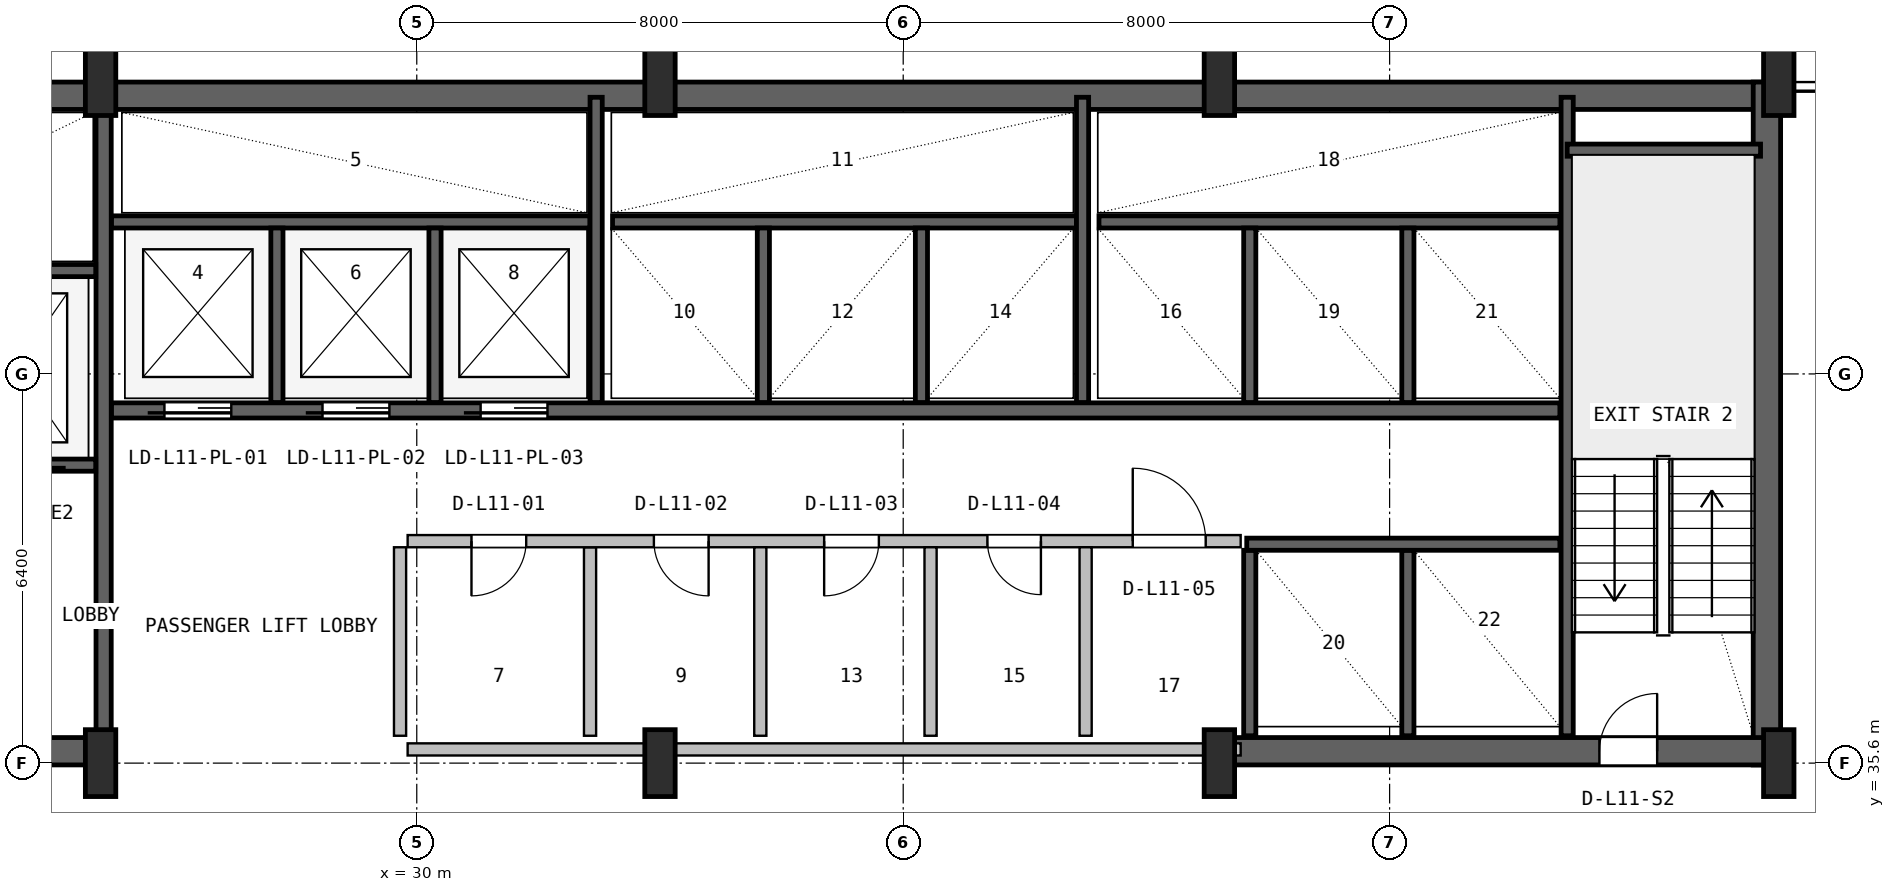
"""IFC4 building model, lengths in metres.
Left out: names, types, materials, properties, quantities, classifications, styles, units other than length and angle.
Written with IfcOpenShell. Run it as: python <this file> out.ifc"""

import sys

from ifc_helpers import new_model, si_unit, direction, frame, frame_2d, origin, origin_2d, place, context, subcontext, project, spatial, rectangle, i_section, extrude, source, transform, mapped, element, fill, save


model = new_model("IFC4")
c1 = context("Model", 3, precision=1e-05, world=origin(), true_north=direction((0.0, 1.0)))
c2 = subcontext(c1, "Body", "Model", "MODEL_VIEW")
j1 = project(units=[si_unit("LENGTHUNIT", "METRE"), si_unit("PLANEANGLEUNIT", "RADIAN")], contexts=[c1])
p1 = place(None, origin())
s1 = spatial("IfcSite", under=j1, at=p1, CompositionType="ELEMENT")
p2 = place(p1, origin())
s2 = spatial("IfcBuilding", under=s1, at=p2, CompositionType="ELEMENT")
p3 = place(p2, frame((0.0, 0.0, 51.0)))
s3 = spatial("IfcBuildingStorey", under=s2, at=p3, CompositionType="ELEMENT", Elevation=51.0)
p4 = place(p3, frame((15.6, 46.575, 0.0), z_axis=(0.0, 0.0, 1.0), x_axis=(1.0, 0.0, 0.0)))
e1 = element("IfcWall", 1, at=p4, inside=s3, PredefinedType="SHEAR", context=c2, shape_type="SweptSolid", body=[
    extrude(rectangle(XDim=36.8, YDim=0.45, at=frame_2d((18.4, 0.0))), origin(), (0.0, 0.0, 1.0), 3.65),
])
p5 = place(p3, frame((52.205, 35.57, 0.0), z_axis=(0.0, 0.0, 1.0), x_axis=(0.0, 1.0, 0.0)))
e2 = element("IfcWall", 2, at=p5, inside=s3, PredefinedType="SHEAR", context=c2, shape_type="SweptSolid", body=[
    extrude(rectangle(XDim=11.23, YDim=0.45, at=frame_2d((5.615, 0.0))), origin(), (0.0, 0.0, 1.0), 3.65),
])
p6 = place(p3, frame((15.57, 35.795, 0.0), z_axis=(0.0, 0.0, 1.0), x_axis=(1.0, 0.0, 0.0)))
e3 = element("IfcWall", 3, at=p6, inside=s3, PredefinedType="SHEAR", context=c2, shape_type="SweptSolid", body=[
    extrude(rectangle(XDim=9.23, YDim=0.45, at=frame_2d((4.615, 0.0))), origin(), (0.0, 0.0, 1.0), 3.65),
])
p7 = place(p6, frame((5.4, 0.0, 0.0)))
e4 = element("IfcOpeningElement", 4, at=p7, cuts=e3, PredefinedType="OPENING", context=c2, shape_type="SweptSolid", body=[
    extrude(rectangle(XDim=1.0, YDim=2.1, at=frame_2d((0.5, 1.05))), frame((0.0, 0.235, 0.0), z_axis=(0.0, -1.0, 0.0), x_axis=(1.0, 0.0, 0.0)), (0.0, 0.0, 1.0), 0.47),
])
p8 = place(p3, frame((43.2, 35.795, 0.0), z_axis=(0.0, 0.0, 1.0), x_axis=(1.0, 0.0, 0.0)))
e5 = element("IfcWall", 5, at=p8, inside=s3, PredefinedType="SHEAR", context=c2, shape_type="SweptSolid", body=[
    extrude(rectangle(XDim=9.23, YDim=0.45, at=frame_2d((4.615, 0.0))), origin(), (0.0, 0.0, 1.0), 3.65),
])
p9 = place(p8, frame((6.25, 0.0, 0.0)))
e6 = element("IfcOpeningElement", 6, at=p9, cuts=e5, PredefinedType="OPENING", context=c2, shape_type="SweptSolid", body=[
    extrude(rectangle(XDim=0.95, YDim=2.1, at=frame_2d((0.475, 1.05))), frame((0.0, 0.235, 0.0), z_axis=(0.0, -1.0, 0.0), x_axis=(1.0, 0.0, 0.0)), (0.0, 0.0, 1.0), 0.47),
])
m1 = source(origin(), c2, "Body", "SweptSolid", [
    extrude(i_section(OverallWidth=0.5, OverallDepth=1.1, WebThickness=0.018, FlangeThickness=0.032, FilletRadius=0.018, at=origin_2d()), origin(), (0.0, 0.0, 1.0), 3.9),
])
for number, where, z_axis, x_axis in (
    (7, (24.8, 35.6, 0.0), (0.0, 0.0, 1.0), (1.0, 0.0, 0.0)),
    (8, (24.8, 46.8, 0.0), (0.0, 0.0, 1.0), (1.0, 0.0, 0.0)),
    (9, (34.0, 35.6, 0.0), (0.0, 0.0, 1.0), (1.0, 0.0, 0.0)),
    (10, (34.0, 46.8, 0.0), (0.0, 0.0, 1.0), (1.0, 0.0, 0.0)),
    (11, (43.2, 35.6, 0.0), (0.0, 0.0, 1.0), (1.0, 0.0, 0.0)),
    (12, (43.2, 46.8, 0.0), (0.0, 0.0, 1.0), (1.0, 0.0, 0.0)),
    (13, (52.4, 35.6, 0.0), (0.0, 0.0, 1.0), (1.0, 0.0, 0.0)),
    (14, (52.4, 46.8, 0.0), (0.0, 0.0, 1.0), (1.0, 0.0, 0.0)),
):
    element("IfcColumn", number, at=place(p3, frame(where, z_axis=z_axis, x_axis=x_axis)), inside=s3, PredefinedType="COLUMN", context=c2, shape_type="MappedRepresentation", body=[
        mapped(m1, transform((0.0, 0.0, 0.0), x_axis=(1.0, 0.0, 0.0), y_axis=(0.0, 1.0, 0.0), z_axis=(0.0, 0.0, 1.0), scale=1.0)),
    ])
p10 = place(p3, frame((24.85, 36.05, 0.0), z_axis=(0.0, 0.0, 1.0), x_axis=(0.0, 1.0, 0.0)))
e15 = element("IfcWall", 15, at=p10, inside=s3, PredefinedType="SHEAR", context=c2, shape_type="SweptSolid", body=[
    extrude(rectangle(XDim=10.45, YDim=0.25, at=frame_2d((5.225, 0.0))), origin(), (0.0, 0.0, 1.0), 3.65),
])
p11 = place(p3, frame((19.2, 40.5, 0.0), z_axis=(0.0, 0.0, 1.0), x_axis=(1.0, 0.0, 0.0)))
e16 = element("IfcWall", 16, at=p11, inside=s3, PredefinedType="SHEAR", context=c2, shape_type="SweptSolid", body=[
    extrude(rectangle(XDim=5.52, YDim=0.2, at=frame_2d((2.76, 0.0))), origin(), (0.0, 0.0, 1.0), 3.65),
])
p12 = place(p11, frame((1.05, 0.0, 0.0)))
e17 = element("IfcOpeningElement", 17, at=p12, cuts=e16, PredefinedType="OPENING", context=c2, shape_type="SweptSolid", body=[
    extrude(rectangle(XDim=1.1, YDim=2.18, at=frame_2d((0.55, 1.09))), frame((0.0, 0.11, 0.0), z_axis=(0.0, -1.0, 0.0), x_axis=(1.0, 0.0, 0.0)), (0.0, 0.0, 1.0), 0.22),
])
p13 = place(p11, frame((3.65, 0.0, 0.0)))
e18 = element("IfcOpeningElement", 18, at=p13, cuts=e16, PredefinedType="OPENING", context=c2, shape_type="SweptSolid", body=[
    extrude(rectangle(XDim=1.1, YDim=2.18, at=frame_2d((0.55, 1.09))), frame((0.0, 0.11, 0.0), z_axis=(0.0, -1.0, 0.0), x_axis=(1.0, 0.0, 0.0)), (0.0, 0.0, 1.0), 0.22),
])
p14 = place(p3, frame((19.2, 43.7, 0.0), z_axis=(0.0, 0.0, 1.0), x_axis=(1.0, 0.0, 0.0)))
e19 = element("IfcWall", 19, at=p14, inside=s3, PredefinedType="SHEAR", context=c2, shape_type="SweptSolid", body=[
    extrude(rectangle(XDim=5.52, YDim=0.2, at=frame_2d((2.76, 0.0))), origin(), (0.0, 0.0, 1.0), 3.65),
])
p15 = place(p3, frame((48.92, 36.05, 0.0), z_axis=(0.0, 0.0, 1.0), x_axis=(0.0, 1.0, 0.0)))
e20 = element("IfcWall", 20, at=p15, inside=s3, PredefinedType="SHEAR", context=c2, shape_type="SweptSolid", body=[
    extrude(rectangle(XDim=10.5, YDim=0.2, at=frame_2d((5.25, 0.0))), origin(), (0.0, 0.0, 1.0), 3.65),
])
p16 = place(p3, frame((48.92, 45.68, 0.0), z_axis=(0.0, 0.0, 1.0), x_axis=(1.0, 0.0, 0.0)))
e21 = element("IfcWall", 21, at=p16, inside=s3, PredefinedType="SHEAR", context=c2, shape_type="SweptSolid", body=[
    extrude(rectangle(XDim=3.18, YDim=0.2, at=frame_2d((1.59, 0.0))), origin(), (0.0, 0.0, 1.0), 3.65),
])
p17 = place(p3, frame((24.98, 41.4, 0.0), z_axis=(0.0, 0.0, 1.0), x_axis=(1.0, 0.0, 0.0)))
e22 = element("IfcWall", 22, at=p17, inside=s3, PredefinedType="SHEAR", context=c2, shape_type="SweptSolid", body=[
    extrude(rectangle(XDim=23.82, YDim=0.25, at=frame_2d((11.91, 0.0))), origin(), (0.0, 0.0, 1.0), 3.65),
])
p18 = place(p17, frame((0.87, 0.0, 0.0)))
e23 = element("IfcOpeningElement", 23, at=p18, cuts=e22, PredefinedType="OPENING", context=c2, shape_type="SweptSolid", body=[
    extrude(rectangle(XDim=1.1, YDim=2.18, at=frame_2d((0.55, 1.09))), frame((0.0, 0.135, 0.0), z_axis=(0.0, -1.0, 0.0), x_axis=(1.0, 0.0, 0.0)), (0.0, 0.0, 1.0), 0.27),
])
p19 = place(p17, frame((3.47, 0.0, 0.0)))
e24 = element("IfcOpeningElement", 24, at=p19, cuts=e22, PredefinedType="OPENING", context=c2, shape_type="SweptSolid", body=[
    extrude(rectangle(XDim=1.1, YDim=2.18, at=frame_2d((0.55, 1.09))), frame((0.0, 0.135, 0.0), z_axis=(0.0, -1.0, 0.0), x_axis=(1.0, 0.0, 0.0)), (0.0, 0.0, 1.0), 0.27),
])
p20 = place(p17, frame((6.07, 0.0, 0.0)))
e25 = element("IfcOpeningElement", 25, at=p20, cuts=e22, PredefinedType="OPENING", context=c2, shape_type="SweptSolid", body=[
    extrude(rectangle(XDim=1.1, YDim=2.18, at=frame_2d((0.55, 1.09))), frame((0.0, 0.135, 0.0), z_axis=(0.0, -1.0, 0.0), x_axis=(1.0, 0.0, 0.0)), (0.0, 0.0, 1.0), 0.27),
])
p21 = place(p3, frame((24.98, 44.5, 0.0), z_axis=(0.0, 0.0, 1.0), x_axis=(1.0, 0.0, 0.0)))
e26 = element("IfcWall", 26, at=p21, inside=s3, PredefinedType="SHEAR", context=c2, shape_type="SweptSolid", body=[
    extrude(rectangle(XDim=7.87, YDim=0.2, at=frame_2d((3.935, 0.0))), origin(), (0.0, 0.0, 1.0), 3.65),
])
for number, where, z_axis, x_axis in (
    (27, (27.7, 41.53, 0.0), (0.0, 0.0, 1.0), (0.0, 1.0, 0.0)),
    (28, (30.3, 41.53, 0.0), (0.0, 0.0, 1.0), (0.0, 1.0, 0.0)),
):
    element("IfcWall", number, at=place(p3, frame(where, z_axis=z_axis, x_axis=x_axis)), inside=s3, PredefinedType="SHEAR", context=c2, shape_type="SweptSolid", body=[
        extrude(rectangle(XDim=2.87, YDim=0.2, at=frame_2d((1.435, 0.0))), origin(), (0.0, 0.0, 1.0), 3.65),
    ])
p22 = place(p3, frame((32.95, 41.53, 0.0), z_axis=(0.0, 0.0, 1.0), x_axis=(0.0, 1.0, 0.0)))
e29 = element("IfcWall", 29, at=p22, inside=s3, PredefinedType="SHEAR", context=c2, shape_type="SweptSolid", body=[
    extrude(rectangle(XDim=5.02, YDim=0.2, at=frame_2d((2.51, 0.0))), origin(), (0.0, 0.0, 1.0), 3.65),
])
p23 = place(p3, frame((33.22, 44.5, 0.0), z_axis=(0.0, 0.0, 1.0), x_axis=(1.0, 0.0, 0.0)))
e30 = element("IfcWall", 30, at=p23, inside=s3, PredefinedType="SHEAR", context=c2, shape_type="SweptSolid", body=[
    extrude(rectangle(XDim=7.63, YDim=0.2, at=frame_2d((3.815, 0.0))), origin(), (0.0, 0.0, 1.0), 3.65),
])
for number, where, z_axis, x_axis in (
    (31, (35.7, 41.53, 0.0), (0.0, 0.0, 1.0), (0.0, 1.0, 0.0)),
    (32, (38.3, 41.53, 0.0), (0.0, 0.0, 1.0), (0.0, 1.0, 0.0)),
):
    element("IfcWall", number, at=place(p3, frame(where, z_axis=z_axis, x_axis=x_axis)), inside=s3, PredefinedType="SHEAR", context=c2, shape_type="SweptSolid", body=[
        extrude(rectangle(XDim=2.87, YDim=0.2, at=frame_2d((1.435, 0.0))), origin(), (0.0, 0.0, 1.0), 3.65),
    ])
p24 = place(p3, frame((40.95, 41.53, 0.0), z_axis=(0.0, 0.0, 1.0), x_axis=(0.0, 1.0, 0.0)))
e33 = element("IfcWall", 33, at=p24, inside=s3, PredefinedType="SHEAR", context=c2, shape_type="SweptSolid", body=[
    extrude(rectangle(XDim=5.02, YDim=0.2, at=frame_2d((2.51, 0.0))), origin(), (0.0, 0.0, 1.0), 3.65),
])
p25 = place(p3, frame((41.22, 44.5, 0.0), z_axis=(0.0, 0.0, 1.0), x_axis=(1.0, 0.0, 0.0)))
e34 = element("IfcWall", 34, at=p25, inside=s3, PredefinedType="SHEAR", context=c2, shape_type="SweptSolid", body=[
    extrude(rectangle(XDim=7.58, YDim=0.2, at=frame_2d((3.79, 0.0))), origin(), (0.0, 0.0, 1.0), 3.65),
])
for number, where, z_axis, x_axis in (
    (35, (43.7, 41.53, 0.0), (0.0, 0.0, 1.0), (0.0, 1.0, 0.0)),
    (36, (46.3, 41.53, 0.0), (0.0, 0.0, 1.0), (0.0, 1.0, 0.0)),
):
    element("IfcWall", number, at=place(p3, frame(where, z_axis=z_axis, x_axis=x_axis)), inside=s3, PredefinedType="SHEAR", context=c2, shape_type="SweptSolid", body=[
        extrude(rectangle(XDim=2.87, YDim=0.2, at=frame_2d((1.435, 0.0))), origin(), (0.0, 0.0, 1.0), 3.65),
    ])
for number, where, z_axis, x_axis in (
    (37, (43.7, 36.05, 0.0), (0.0, 0.0, 1.0), (0.0, 1.0, 0.0)),
    (38, (46.3, 36.05, 0.0), (0.0, 0.0, 1.0), (0.0, 1.0, 0.0)),
):
    element("IfcWall", number, at=place(p3, frame(where, z_axis=z_axis, x_axis=x_axis)), inside=s3, PredefinedType="SHEAR", context=c2, shape_type="SweptSolid", body=[
        extrude(rectangle(XDim=3.05, YDim=0.2, at=frame_2d((1.525, 0.0))), origin(), (0.0, 0.0, 1.0), 3.65),
    ])
p26 = place(p3, frame((43.65, 39.2, 0.0), z_axis=(0.0, 0.0, 1.0), x_axis=(1.0, 0.0, 0.0)))
e39 = element("IfcWall", 39, at=p26, inside=s3, PredefinedType="SHEAR", context=c2, shape_type="SweptSolid", body=[
    extrude(rectangle(XDim=5.15, YDim=0.2, at=frame_2d((2.575, 0.0))), origin(), (0.0, 0.0, 1.0), 3.65),
])
p27 = place(p3, frame((29.85, 35.825, 0.0), z_axis=(0.0, 0.0, 1.0), x_axis=(1.0, 0.0, 0.0)))
e40 = element("IfcWall", 40, at=p27, inside=s3, PredefinedType="SOLIDWALL", context=c2, shape_type="SweptSolid", body=[
    extrude(rectangle(XDim=13.7, YDim=0.2, at=frame_2d((6.85, 0.0))), origin(), (0.0, 0.0, 1.0), 2.425),
])
p28 = place(p3, frame((32.85, 36.05, 0.0), z_axis=(0.0, 0.0, 1.0), x_axis=(0.0, 1.0, 0.0)))
e41 = element("IfcWall", 41, at=p28, inside=s3, PredefinedType="PLUMBINGWALL", context=c2, shape_type="SweptSolid", body=[
    extrude(rectangle(XDim=3.1, YDim=0.2, at=frame_2d((1.55, 0.0))), origin(), (0.0, 0.0, 1.0), 3.63),
])
p29 = place(p3, frame((29.85, 39.25, 0.0), z_axis=(0.0, 0.0, 1.0), x_axis=(1.0, 0.0, 0.0)))
e42 = element("IfcWall", 42, at=p29, inside=s3, PredefinedType="SOLIDWALL", context=c2, shape_type="SweptSolid", body=[
    extrude(rectangle(XDim=13.7, YDim=0.2, at=frame_2d((6.85, 0.0))), origin(), (0.0, 0.0, 1.0), 3.63),
])
p30 = place(p29, frame((1.05, 0.0, 0.0)))
e43 = element("IfcOpeningElement", 43, at=p30, cuts=e42, PredefinedType="OPENING", context=c2, shape_type="SweptSolid", body=[
    extrude(rectangle(XDim=0.9, YDim=2.06, at=frame_2d((0.45, 1.03))), frame((0.0, 0.11, 0.0), z_axis=(0.0, -1.0, 0.0), x_axis=(1.0, 0.0, 0.0)), (0.0, 0.0, 1.0), 0.22),
])
p31 = place(p29, frame((4.05, 0.0, 0.0)))
e44 = element("IfcOpeningElement", 44, at=p31, cuts=e42, PredefinedType="OPENING", context=c2, shape_type="SweptSolid", body=[
    extrude(rectangle(XDim=0.9, YDim=2.06, at=frame_2d((0.45, 1.03))), frame((0.0, 0.11, 0.0), z_axis=(0.0, -1.0, 0.0), x_axis=(1.0, 0.0, 0.0)), (0.0, 0.0, 1.0), 0.22),
])
p32 = place(p29, frame((6.85, 0.0, 0.0)))
e45 = element("IfcOpeningElement", 45, at=p32, cuts=e42, PredefinedType="OPENING", context=c2, shape_type="SweptSolid", body=[
    extrude(rectangle(XDim=0.9, YDim=2.06, at=frame_2d((0.45, 1.03))), frame((0.0, 0.11, 0.0), z_axis=(0.0, -1.0, 0.0), x_axis=(1.0, 0.0, 0.0)), (0.0, 0.0, 1.0), 0.22),
])
p33 = place(p29, frame((9.535, 0.0, 0.0)))
e46 = element("IfcOpeningElement", 46, at=p33, cuts=e42, PredefinedType="OPENING", context=c2, shape_type="SweptSolid", body=[
    extrude(rectangle(XDim=0.88, YDim=2.06, at=frame_2d((0.44, 1.03))), frame((0.0, 0.11, 0.0), z_axis=(0.0, -1.0, 0.0), x_axis=(1.0, 0.0, 0.0)), (0.0, 0.0, 1.0), 0.22),
])
p34 = place(p29, frame((11.925, 0.0, 0.0)))
e47 = element("IfcOpeningElement", 47, at=p34, cuts=e42, PredefinedType="OPENING", context=c2, shape_type="SweptSolid", body=[
    extrude(rectangle(XDim=1.2, YDim=2.1, at=frame_2d((0.6, 1.05))), frame((0.0, 0.11, 0.0), z_axis=(0.0, -1.0, 0.0), x_axis=(1.0, 0.0, 0.0)), (0.0, 0.0, 1.0), 0.22),
])
for number, where, z_axis, x_axis in (
    (48, (29.725, 36.05, 0.0), (0.0, 0.0, 1.0), (0.0, 1.0, 0.0)),
    (49, (35.65, 36.05, 0.0), (0.0, 0.0, 1.0), (0.0, 1.0, 0.0)),
    (50, (38.45, 36.05, 0.0), (0.0, 0.0, 1.0), (0.0, 1.0, 0.0)),
):
    element("IfcWall", number, at=place(p3, frame(where, z_axis=z_axis, x_axis=x_axis)), inside=s3, PredefinedType="PLUMBINGWALL", context=c2, shape_type="SweptSolid", body=[
        extrude(rectangle(XDim=3.1, YDim=0.2, at=frame_2d((1.55, 0.0))), origin(), (0.0, 0.0, 1.0), 3.63),
    ])
p35 = place(p3, frame((41.0, 36.05, 0.0), z_axis=(0.0, 0.0, 1.0), x_axis=(0.0, 1.0, 0.0)))
e51 = element("IfcWall", 51, at=p35, inside=s3, PredefinedType="SOLIDWALL", context=c2, shape_type="SweptSolid", body=[
    extrude(rectangle(XDim=3.1, YDim=0.2, at=frame_2d((1.55, 0.0))), origin(), (0.0, 0.0, 1.0), 3.63),
])
m2 = source(origin(), c2, "Body", "SweptSolid", [
    extrude(rectangle(XDim=0.95, YDim=2.1, at=frame_2d((0.475, 1.05))), frame((0.0, 0.025, 0.0), z_axis=(0.0, -1.0, 0.0), x_axis=(1.0, 0.0, 0.0)), (0.0, 0.0, 1.0), 0.05),
])
p36 = place(p9, origin())
e52 = element("IfcDoor", 52, at=p36, inside=s3, OperationType="SINGLE_SWING_RIGHT", PredefinedType="DOOR", context=c2, shape_type="MappedRepresentation", body=[
    mapped(m2, transform((0.0, 0.0, 0.0), x_axis=(1.0, 0.0, 0.0), y_axis=(0.0, 1.0, 0.0), z_axis=(0.0, 0.0, 1.0), scale=1.0)),
])
fill(e6, e52)
m3 = source(origin(), c2, "Body", "SweptSolid", [
    extrude(rectangle(XDim=1.1, YDim=2.18, at=frame_2d((0.55, 1.09))), frame((0.0, 0.025, 0.0), z_axis=(0.0, -1.0, 0.0), x_axis=(1.0, 0.0, 0.0)), (0.0, 0.0, 1.0), 0.05),
])
p37 = place(p18, frame((1.1, 0.0, 0.0), z_axis=(0.0, 0.0, 1.0), x_axis=(-1.0, 0.0, 0.0)))
e53 = element("IfcDoor", 53, at=p37, inside=s3, OperationType="SLIDING_TO_LEFT", PredefinedType="DOOR", context=c2, shape_type="MappedRepresentation", body=[
    mapped(m3, transform((0.0, 0.0, 0.0), x_axis=(1.0, 0.0, 0.0), y_axis=(0.0, 1.0, 0.0), z_axis=(0.0, 0.0, 1.0), scale=1.0)),
])
fill(e23, e53)
p38 = place(p19, frame((1.1, 0.0, 0.0), z_axis=(0.0, 0.0, 1.0), x_axis=(-1.0, 0.0, 0.0)))
e54 = element("IfcDoor", 54, at=p38, inside=s3, OperationType="SLIDING_TO_LEFT", PredefinedType="DOOR", context=c2, shape_type="MappedRepresentation", body=[
    mapped(m3, transform((0.0, 0.0, 0.0), x_axis=(1.0, 0.0, 0.0), y_axis=(0.0, 1.0, 0.0), z_axis=(0.0, 0.0, 1.0), scale=1.0)),
])
fill(e24, e54)
p39 = place(p20, frame((1.1, 0.0, 0.0), z_axis=(0.0, 0.0, 1.0), x_axis=(-1.0, 0.0, 0.0)))
e55 = element("IfcDoor", 55, at=p39, inside=s3, OperationType="SLIDING_TO_LEFT", PredefinedType="DOOR", context=c2, shape_type="MappedRepresentation", body=[
    mapped(m3, transform((0.0, 0.0, 0.0), x_axis=(1.0, 0.0, 0.0), y_axis=(0.0, 1.0, 0.0), z_axis=(0.0, 0.0, 1.0), scale=1.0)),
])
fill(e25, e55)
m4 = source(origin(), c2, "Body", "SweptSolid", [
    extrude(rectangle(XDim=0.9, YDim=2.06, at=frame_2d((0.45, 1.03))), frame((0.0, 0.025, 0.0), z_axis=(0.0, -1.0, 0.0), x_axis=(1.0, 0.0, 0.0)), (0.0, 0.0, 1.0), 0.05),
])
p40 = place(p30, frame((0.9, 0.0, 0.0), z_axis=(0.0, 0.0, 1.0), x_axis=(-1.0, 0.0, 0.0)))
e56 = element("IfcDoor", 56, at=p40, inside=s3, OperationType="SINGLE_SWING_LEFT", PredefinedType="DOOR", context=c2, shape_type="MappedRepresentation", body=[
    mapped(m4, transform((0.0, 0.0, 0.0), x_axis=(1.0, 0.0, 0.0), y_axis=(0.0, 1.0, 0.0), z_axis=(0.0, 0.0, 1.0), scale=1.0)),
])
fill(e43, e56)
p41 = place(p31, frame((0.9, 0.0, 0.0), z_axis=(0.0, 0.0, 1.0), x_axis=(-1.0, 0.0, 0.0)))
e57 = element("IfcDoor", 57, at=p41, inside=s3, OperationType="SINGLE_SWING_RIGHT", PredefinedType="DOOR", context=c2, shape_type="MappedRepresentation", body=[
    mapped(m4, transform((0.0, 0.0, 0.0), x_axis=(1.0, 0.0, 0.0), y_axis=(0.0, 1.0, 0.0), z_axis=(0.0, 0.0, 1.0), scale=1.0)),
])
fill(e44, e57)
p42 = place(p32, frame((0.9, 0.0, 0.0), z_axis=(0.0, 0.0, 1.0), x_axis=(-1.0, 0.0, 0.0)))
e58 = element("IfcDoor", 58, at=p42, inside=s3, OperationType="SINGLE_SWING_LEFT", PredefinedType="DOOR", context=c2, shape_type="MappedRepresentation", body=[
    mapped(m4, transform((0.0, 0.0, 0.0), x_axis=(1.0, 0.0, 0.0), y_axis=(0.0, 1.0, 0.0), z_axis=(0.0, 0.0, 1.0), scale=1.0)),
])
fill(e45, e58)
m5 = source(origin(), c2, "Body", "SweptSolid", [
    extrude(rectangle(XDim=0.88, YDim=2.06, at=frame_2d((0.44, 1.03))), frame((0.0, 0.025, 0.0), z_axis=(0.0, -1.0, 0.0), x_axis=(1.0, 0.0, 0.0)), (0.0, 0.0, 1.0), 0.05),
])
p43 = place(p33, frame((0.88, 0.0, 0.0), z_axis=(0.0, 0.0, 1.0), x_axis=(-1.0, 0.0, 0.0)))
e59 = element("IfcDoor", 59, at=p43, inside=s3, OperationType="SINGLE_SWING_RIGHT", PredefinedType="DOOR", context=c2, shape_type="MappedRepresentation", body=[
    mapped(m5, transform((0.0, 0.0, 0.0), x_axis=(1.0, 0.0, 0.0), y_axis=(0.0, 1.0, 0.0), z_axis=(0.0, 0.0, 1.0), scale=1.0)),
])
fill(e46, e59)
m6 = source(origin(), c2, "Body", "SweptSolid", [
    extrude(rectangle(XDim=1.2, YDim=2.1, at=frame_2d((0.6, 1.05))), frame((0.0, 0.025, 0.0), z_axis=(0.0, -1.0, 0.0), x_axis=(1.0, 0.0, 0.0)), (0.0, 0.0, 1.0), 0.05),
])
p44 = place(p34, origin())
e60 = element("IfcDoor", 60, at=p44, inside=s3, OperationType="SINGLE_SWING_LEFT", PredefinedType="DOOR", context=c2, shape_type="MappedRepresentation", body=[
    mapped(m6, transform((0.0, 0.0, 0.0), x_axis=(1.0, 0.0, 0.0), y_axis=(0.0, 1.0, 0.0), z_axis=(0.0, 0.0, 1.0), scale=1.0)),
])
fill(e47, e60)
save(model, sys.argv[1])
